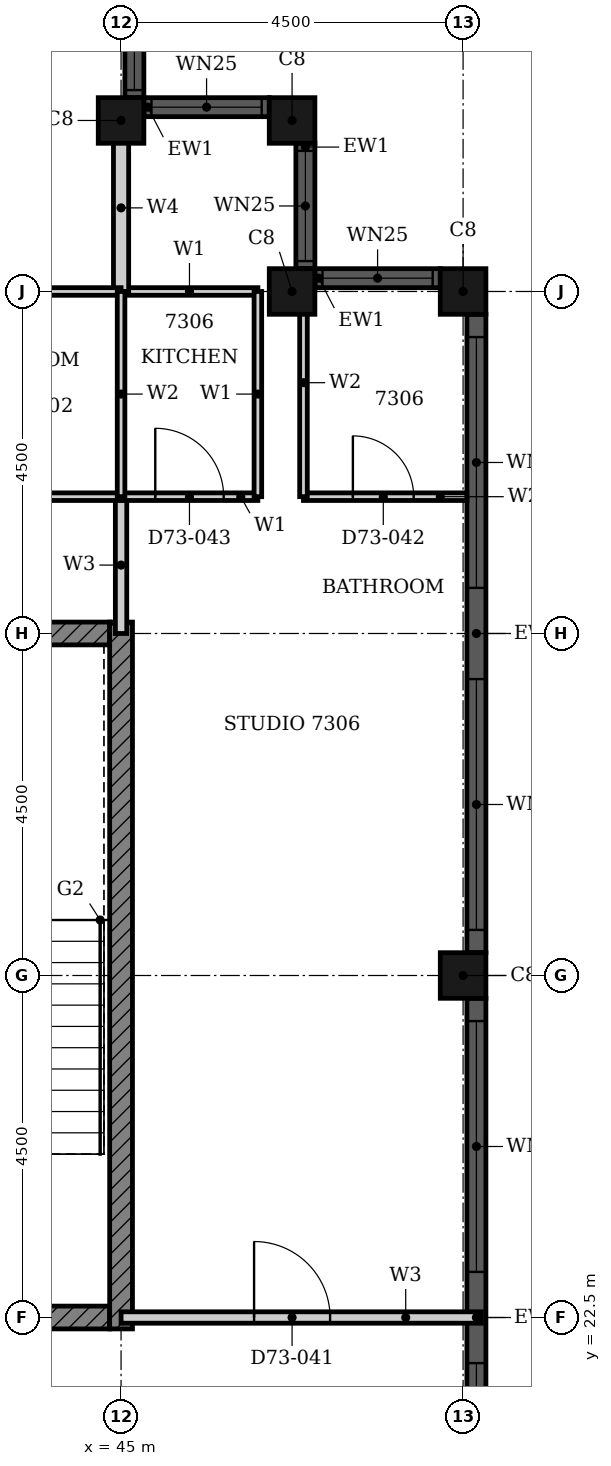
"""IFC4 building model, lengths in metres.
Left out: names, types, materials, properties, quantities, classifications, styles, units other than length and angle.
Written with IfcOpenShell. Run it as: python <this file> out.ifc"""

import sys

from ifc_helpers import new_model, si_unit, direction, frame, frame_2d, origin, origin_2d, place, context, subcontext, project, spatial, rectangle, hollow_rectangle, extrude, element, fill, save


model = new_model("IFC4")
c1 = context("Model", 3, precision=1e-05, world=origin(), true_north=direction((0.0, 1.0)))
c2 = subcontext(c1, "Body", "Model", "MODEL_VIEW")
j1 = project(units=[si_unit("LENGTHUNIT", "METRE"), si_unit("PLANEANGLEUNIT", "RADIAN")], contexts=[c1])
p1 = place(None, origin())
s1 = spatial("IfcSite", under=j1, at=p1, CompositionType="ELEMENT")
p2 = place(p1, origin())
s2 = spatial("IfcBuilding", under=s1, at=p2, CompositionType="ELEMENT")
p3 = place(p2, frame((0.0, 0.0, 287.1)))
s3 = spatial("IfcBuildingStorey", under=s2, at=p3, CompositionType="ELEMENT", Elevation=287.1)
for number, where, z_axis, x_axis in (
    (1, (49.5, 27.0, 0.0), (0.0, 0.0, 1.0), (1.0, 0.0, 0.0)),
    (2, (49.5, 36.0, 0.0), (0.0, 0.0, 1.0), (1.0, 0.0, 0.0)),
    (3, (47.25, 36.0, 0.0), (0.0, 0.0, 1.0), (1.0, 0.0, 0.0)),
    (4, (47.25, 38.25, 0.0), (0.0, 0.0, 1.0), (1.0, 0.0, 0.0)),
    (5, (45.0, 38.25, 0.0), (0.0, 0.0, 1.0), (1.0, 0.0, 0.0)),
):
    element("IfcColumn", number, at=place(p3, frame(where, z_axis=z_axis, x_axis=x_axis)), inside=s3, PredefinedType="COLUMN", context=c2, shape_type="SweptSolid", body=[
        extrude(hollow_rectangle(XDim=0.6, YDim=0.6, WallThickness=0.02, at=origin_2d()), origin(), (0.0, 0.0, 1.0), 3.7),
    ])
p4 = place(p3, frame((49.675, 18.3, 0.0), z_axis=(0.0, 0.0, 1.0), x_axis=(0.0, 1.0, 0.0)))
e6 = element("IfcWall", 6, at=p4, inside=s3, PredefinedType="SOLIDWALL", context=c2, shape_type="SweptSolid", body=[
    extrude(rectangle(XDim=8.4, YDim=0.25, at=frame_2d((4.2, 0.0))), origin(), (0.0, 0.0, 1.0), 3.7),
])
p5 = place(p4, frame((0.3, 0.0, 0.45)))
e7 = element("IfcOpeningElement", 7, at=p5, cuts=e6, PredefinedType="OPENING", context=c2, shape_type="SweptSolid", body=[
    extrude(rectangle(XDim=3.3, YDim=2.3, at=frame_2d((1.65, 1.15))), frame((0.0, 0.135, 0.0), z_axis=(0.0, -1.0, 0.0), x_axis=(1.0, 0.0, 0.0)), (0.0, 0.0, 1.0), 0.27),
])
p6 = place(p4, frame((4.8, 0.0, 0.45)))
e8 = element("IfcOpeningElement", 8, at=p6, cuts=e6, PredefinedType="OPENING", context=c2, shape_type="SweptSolid", body=[
    extrude(rectangle(XDim=3.3, YDim=2.3, at=frame_2d((1.65, 1.15))), frame((0.0, 0.135, 0.0), z_axis=(0.0, -1.0, 0.0), x_axis=(1.0, 0.0, 0.0)), (0.0, 0.0, 1.0), 0.27),
])
p7 = place(p3, frame((49.675, 27.3, 0.0), z_axis=(0.0, 0.0, 1.0), x_axis=(0.0, 1.0, 0.0)))
e9 = element("IfcWall", 9, at=p7, inside=s3, PredefinedType="SOLIDWALL", context=c2, shape_type="SweptSolid", body=[
    extrude(rectangle(XDim=8.4, YDim=0.25, at=frame_2d((4.2, 0.0))), origin(), (0.0, 0.0, 1.0), 3.7),
])
p8 = place(p7, frame((0.3, 0.0, 0.45)))
e10 = element("IfcOpeningElement", 10, at=p8, cuts=e9, PredefinedType="OPENING", context=c2, shape_type="SweptSolid", body=[
    extrude(rectangle(XDim=3.3, YDim=2.3, at=frame_2d((1.65, 1.15))), frame((0.0, 0.135, 0.0), z_axis=(0.0, -1.0, 0.0), x_axis=(1.0, 0.0, 0.0)), (0.0, 0.0, 1.0), 0.27),
])
p9 = place(p7, frame((4.8, 0.0, 0.45)))
e11 = element("IfcOpeningElement", 11, at=p9, cuts=e9, PredefinedType="OPENING", context=c2, shape_type="SweptSolid", body=[
    extrude(rectangle(XDim=3.3, YDim=2.3, at=frame_2d((1.65, 1.15))), frame((0.0, 0.135, 0.0), z_axis=(0.0, -1.0, 0.0), x_axis=(1.0, 0.0, 0.0)), (0.0, 0.0, 1.0), 0.27),
])
p10 = place(p3, frame((49.2, 36.175, 0.0), z_axis=(0.0, 0.0, 1.0), x_axis=(-1.0, 0.0, 0.0)))
e12 = element("IfcWall", 12, at=p10, inside=s3, PredefinedType="SOLIDWALL", context=c2, shape_type="SweptSolid", body=[
    extrude(rectangle(XDim=1.65, YDim=0.25, at=frame_2d((0.825, 0.0))), origin(), (0.0, 0.0, 1.0), 3.7),
])
p11 = place(p10, frame((0.1, 0.0, 0.9)))
e13 = element("IfcOpeningElement", 13, at=p11, cuts=e12, PredefinedType="OPENING", context=c2, shape_type="SweptSolid", body=[
    extrude(rectangle(XDim=1.45, YDim=1.85, at=frame_2d((0.725, 0.925))), frame((0.0, 0.135, 0.0), z_axis=(0.0, -1.0, 0.0), x_axis=(1.0, 0.0, 0.0)), (0.0, 0.0, 1.0), 0.27),
])
p12 = place(p3, frame((47.425, 36.3, 0.0), z_axis=(0.0, 0.0, 1.0), x_axis=(0.0, 1.0, 0.0)))
e14 = element("IfcWall", 14, at=p12, inside=s3, PredefinedType="SOLIDWALL", context=c2, shape_type="SweptSolid", body=[
    extrude(rectangle(XDim=1.65, YDim=0.25, at=frame_2d((0.825, 0.0))), origin(), (0.0, 0.0, 1.0), 3.7),
])
p13 = place(p12, frame((0.1, 0.0, 0.9)))
e15 = element("IfcOpeningElement", 15, at=p13, cuts=e14, PredefinedType="OPENING", context=c2, shape_type="SweptSolid", body=[
    extrude(rectangle(XDim=1.45, YDim=1.85, at=frame_2d((0.725, 0.925))), frame((0.0, 0.135, 0.0), z_axis=(0.0, -1.0, 0.0), x_axis=(1.0, 0.0, 0.0)), (0.0, 0.0, 1.0), 0.27),
])
p14 = place(p3, frame((46.95, 38.425, 0.0), z_axis=(0.0, 0.0, 1.0), x_axis=(-1.0, 0.0, 0.0)))
e16 = element("IfcWall", 16, at=p14, inside=s3, PredefinedType="SOLIDWALL", context=c2, shape_type="SweptSolid", body=[
    extrude(rectangle(XDim=1.65, YDim=0.25, at=frame_2d((0.825, 0.0))), origin(), (0.0, 0.0, 1.0), 3.7),
])
p15 = place(p14, frame((0.1, 0.0, 0.9)))
e17 = element("IfcOpeningElement", 17, at=p15, cuts=e16, PredefinedType="OPENING", context=c2, shape_type="SweptSolid", body=[
    extrude(rectangle(XDim=1.45, YDim=1.85, at=frame_2d((0.725, 0.925))), frame((0.0, 0.135, 0.0), z_axis=(0.0, -1.0, 0.0), x_axis=(1.0, 0.0, 0.0)), (0.0, 0.0, 1.0), 0.27),
])
p16 = place(p3, frame((45.175, 38.55, 0.0), z_axis=(0.0, 0.0, 1.0), x_axis=(0.0, 1.0, 0.0)))
e18 = element("IfcWall", 18, at=p16, inside=s3, PredefinedType="SOLIDWALL", context=c2, shape_type="SweptSolid", body=[
    extrude(rectangle(XDim=1.65, YDim=0.25, at=frame_2d((0.825, 0.0))), origin(), (0.0, 0.0, 1.0), 3.7),
])
p17 = place(p16, frame((0.1, 0.0, 0.9)))
e19 = element("IfcOpeningElement", 19, at=p17, cuts=e18, PredefinedType="OPENING", context=c2, shape_type="SweptSolid", body=[
    extrude(rectangle(XDim=1.45, YDim=1.85, at=frame_2d((0.725, 0.925))), frame((0.0, 0.135, 0.0), z_axis=(0.0, -1.0, 0.0), x_axis=(1.0, 0.0, 0.0)), (0.0, 0.0, 1.0), 0.27),
])
p18 = place(p3, frame((30.339, 22.5, 0.0), z_axis=(0.0, 0.0, 1.0), x_axis=(1.0, 0.0, 0.0)))
e20 = element("IfcWall", 20, at=p18, inside=s3, PredefinedType="SHEAR", context=c2, shape_type="SweptSolid", body=[
    extrude(rectangle(XDim=14.511, YDim=0.3, at=frame_2d((7.255, 0.0))), origin(), (0.0, 0.0, 1.0), 3.4),
])
p19 = place(p18, frame((7.975, 0.0, 0.0)))
e21 = element("IfcOpeningElement", 21, at=p19, cuts=e20, PredefinedType="OPENING", context=c2, shape_type="SweptSolid", body=[
    extrude(rectangle(XDim=1.8, YDim=2.1, at=frame_2d((0.9, 1.05))), frame((0.0, 0.16, 0.0), z_axis=(0.0, -1.0, 0.0), x_axis=(1.0, 0.0, 0.0)), (0.0, 0.0, 1.0), 0.32),
])
p20 = place(p3, frame((40.625, 31.5, 0.0), z_axis=(0.0, 0.0, 1.0), x_axis=(1.0, 0.0, 0.0)))
e22 = element("IfcWall", 22, at=p20, inside=s3, PredefinedType="SHEAR", context=c2, shape_type="SweptSolid", body=[
    extrude(rectangle(XDim=4.225, YDim=0.3, at=frame_2d((2.113, 0.0))), origin(), (0.0, 0.0, 1.0), 3.4),
])
p21 = place(p3, frame((45.0, 22.35, 0.0), z_axis=(0.0, 0.0, 1.0), x_axis=(0.0, 1.0, 0.0)))
e23 = element("IfcWall", 23, at=p21, inside=s3, PredefinedType="SHEAR", context=c2, shape_type="SweptSolid", body=[
    extrude(rectangle(XDim=9.3, YDim=0.3, at=frame_2d((4.65, 0.0))), origin(), (0.0, 0.0, 1.0), 3.4),
])
p22 = place(p3, frame((45.0, 22.5, 0.0), z_axis=(0.0, 0.0, 1.0), x_axis=(1.0, 0.0, 0.0)))
e24 = element("IfcWall", 24, at=p22, inside=s3, PredefinedType="PARTITIONING", context=c2, shape_type="SweptSolid", body=[
    extrude(rectangle(XDim=4.74, YDim=0.15, at=frame_2d((2.37, 0.0))), origin(), (0.0, 0.0, 1.0), 3.4),
])
p23 = place(p22, frame((1.75, 0.0, 0.0)))
e25 = element("IfcOpeningElement", 25, at=p23, cuts=e24, PredefinedType="OPENING", context=c2, shape_type="SweptSolid", body=[
    extrude(rectangle(XDim=1.0, YDim=2.2, at=frame_2d((0.5, 1.1))), frame((0.0, 0.085, 0.0), z_axis=(0.0, -1.0, 0.0), x_axis=(1.0, 0.0, 0.0)), (0.0, 0.0, 1.0), 0.17),
])
p24 = place(p3, frame((45.0, 31.5, 0.0), z_axis=(0.0, 0.0, 1.0), x_axis=(0.0, 1.0, 0.0)))
e26 = element("IfcWall", 26, at=p24, inside=s3, PredefinedType="PARTITIONING", context=c2, shape_type="SweptSolid", body=[
    extrude(rectangle(XDim=1.8, YDim=0.15, at=frame_2d((0.9, 0.0))), origin(), (0.0, 0.0, 1.0), 3.4),
])
p25 = place(p3, frame((45.0, 33.3, 0.0), z_axis=(0.0, 0.0, 1.0), x_axis=(1.0, 0.0, 0.0)))
e27 = element("IfcWall", 27, at=p25, inside=s3, PredefinedType="PARTITIONING", context=c2, shape_type="SweptSolid", body=[
    extrude(rectangle(XDim=1.8, YDim=0.1, at=frame_2d((0.9, 0.0))), origin(), (0.0, 0.0, 1.0), 3.4),
])
p26 = place(p25, frame((0.45, 0.0, 0.0)))
e28 = element("IfcOpeningElement", 28, at=p26, cuts=e27, PredefinedType="OPENING", context=c2, shape_type="SweptSolid", body=[
    extrude(rectangle(XDim=0.9, YDim=2.1, at=frame_2d((0.45, 1.05))), frame((0.0, 0.06, 0.0), z_axis=(0.0, -1.0, 0.0), x_axis=(1.0, 0.0, 0.0)), (0.0, 0.0, 1.0), 0.12),
])
p27 = place(p3, frame((45.0, 36.0, 0.0), z_axis=(0.0, 0.0, 1.0), x_axis=(1.0, 0.0, 0.0)))
e29 = element("IfcWall", 29, at=p27, inside=s3, PredefinedType="PARTITIONING", context=c2, shape_type="SweptSolid", body=[
    extrude(rectangle(XDim=1.8, YDim=0.1, at=frame_2d((0.9, 0.0))), origin(), (0.0, 0.0, 1.0), 3.4),
])
p28 = place(p3, frame((46.8, 33.3, 0.0), z_axis=(0.0, 0.0, 1.0), x_axis=(0.0, 1.0, 0.0)))
e30 = element("IfcWall", 30, at=p28, inside=s3, PredefinedType="PARTITIONING", context=c2, shape_type="SweptSolid", body=[
    extrude(rectangle(XDim=2.7, YDim=0.1, at=frame_2d((1.35, 0.0))), origin(), (0.0, 0.0, 1.0), 3.4),
])
p29 = place(p3, frame((45.0, 36.0, 0.0), z_axis=(0.0, 0.0, 1.0), x_axis=(0.0, 1.0, 0.0)))
e31 = element("IfcWall", 31, at=p29, inside=s3, PredefinedType="PARTITIONING", context=c2, shape_type="SweptSolid", body=[
    extrude(rectangle(XDim=2.2, YDim=0.2, at=frame_2d((1.1, 0.0))), origin(), (0.0, 0.0, 1.0), 3.4),
])
p30 = place(p3, frame((42.0, 33.3, 0.0), z_axis=(0.0, 0.0, 1.0), x_axis=(1.0, 0.0, 0.0)))
e32 = element("IfcWall", 32, at=p30, inside=s3, PredefinedType="PARTITIONING", context=c2, shape_type="SweptSolid", body=[
    extrude(rectangle(XDim=3.0, YDim=0.1, at=frame_2d((1.5, 0.0))), origin(), (0.0, 0.0, 1.0), 3.4),
])
p31 = place(p3, frame((47.4, 33.3, 0.0), z_axis=(0.0, 0.0, 1.0), x_axis=(1.0, 0.0, 0.0)))
e33 = element("IfcWall", 33, at=p31, inside=s3, PredefinedType="PARTITIONING", context=c2, shape_type="SweptSolid", body=[
    extrude(rectangle(XDim=2.15, YDim=0.1, at=frame_2d((1.075, 0.0))), origin(), (0.0, 0.0, 1.0), 3.4),
])
p32 = place(p31, frame((0.65, 0.0, 0.0)))
e34 = element("IfcOpeningElement", 34, at=p32, cuts=e33, PredefinedType="OPENING", context=c2, shape_type="SweptSolid", body=[
    extrude(rectangle(XDim=0.8, YDim=2.1, at=frame_2d((0.4, 1.05))), frame((0.0, 0.06, 0.0), z_axis=(0.0, -1.0, 0.0), x_axis=(1.0, 0.0, 0.0)), (0.0, 0.0, 1.0), 0.12),
])
p33 = place(p3, frame((42.0, 36.0, 0.0), z_axis=(0.0, 0.0, 1.0), x_axis=(1.0, 0.0, 0.0)))
e35 = element("IfcWall", 35, at=p33, inside=s3, PredefinedType="PARTITIONING", context=c2, shape_type="SweptSolid", body=[
    extrude(rectangle(XDim=3.0, YDim=0.1, at=frame_2d((1.5, 0.0))), origin(), (0.0, 0.0, 1.0), 3.4),
])
p34 = place(p3, frame((45.0, 33.3, 0.0), z_axis=(0.0, 0.0, 1.0), x_axis=(0.0, 1.0, 0.0)))
e36 = element("IfcWall", 36, at=p34, inside=s3, PredefinedType="PARTITIONING", context=c2, shape_type="SweptSolid", body=[
    extrude(rectangle(XDim=2.7, YDim=0.1, at=frame_2d((1.35, 0.0))), origin(), (0.0, 0.0, 1.0), 3.4),
])
p35 = place(p3, frame((47.4, 33.3, 0.0), z_axis=(0.0, 0.0, 1.0), x_axis=(0.0, 1.0, 0.0)))
e37 = element("IfcWall", 37, at=p35, inside=s3, PredefinedType="PARTITIONING", context=c2, shape_type="SweptSolid", body=[
    extrude(rectangle(XDim=3.0, YDim=0.1, at=frame_2d((1.5, 0.0))), origin(), (0.0, 0.0, 1.0), 3.4),
])
p36 = place(p5, origin())
e38 = element("IfcWindow", 38, at=p36, inside=s3, PartitioningType="SINGLE_PANEL", PredefinedType="WINDOW", context=c2, shape_type="SweptSolid", body=[
    extrude(rectangle(XDim=3.3, YDim=2.3, at=frame_2d((1.65, 1.15))), frame((0.0, 0.03, 0.0), z_axis=(0.0, -1.0, 0.0), x_axis=(1.0, 0.0, 0.0)), (0.0, 0.0, 1.0), 0.06),
])
fill(e7, e38)
p37 = place(p6, origin())
e39 = element("IfcWindow", 39, at=p37, inside=s3, PartitioningType="SINGLE_PANEL", PredefinedType="WINDOW", context=c2, shape_type="SweptSolid", body=[
    extrude(rectangle(XDim=3.3, YDim=2.3, at=frame_2d((1.65, 1.15))), frame((0.0, 0.03, 0.0), z_axis=(0.0, -1.0, 0.0), x_axis=(1.0, 0.0, 0.0)), (0.0, 0.0, 1.0), 0.06),
])
fill(e8, e39)
p38 = place(p8, origin())
e40 = element("IfcWindow", 40, at=p38, inside=s3, PartitioningType="SINGLE_PANEL", PredefinedType="WINDOW", context=c2, shape_type="SweptSolid", body=[
    extrude(rectangle(XDim=3.3, YDim=2.3, at=frame_2d((1.65, 1.15))), frame((0.0, 0.03, 0.0), z_axis=(0.0, -1.0, 0.0), x_axis=(1.0, 0.0, 0.0)), (0.0, 0.0, 1.0), 0.06),
])
fill(e10, e40)
p39 = place(p9, origin())
e41 = element("IfcWindow", 41, at=p39, inside=s3, PartitioningType="SINGLE_PANEL", PredefinedType="WINDOW", context=c2, shape_type="SweptSolid", body=[
    extrude(rectangle(XDim=3.3, YDim=2.3, at=frame_2d((1.65, 1.15))), frame((0.0, 0.03, 0.0), z_axis=(0.0, -1.0, 0.0), x_axis=(1.0, 0.0, 0.0)), (0.0, 0.0, 1.0), 0.06),
])
fill(e11, e41)
p40 = place(p11, origin())
e42 = element("IfcWindow", 42, at=p40, inside=s3, PartitioningType="SINGLE_PANEL", PredefinedType="WINDOW", context=c2, shape_type="SweptSolid", body=[
    extrude(rectangle(XDim=1.45, YDim=1.85, at=frame_2d((0.725, 0.925))), frame((0.0, 0.03, 0.0), z_axis=(0.0, -1.0, 0.0), x_axis=(1.0, 0.0, 0.0)), (0.0, 0.0, 1.0), 0.06),
])
fill(e13, e42)
p41 = place(p13, origin())
e43 = element("IfcWindow", 43, at=p41, inside=s3, PartitioningType="SINGLE_PANEL", PredefinedType="WINDOW", context=c2, shape_type="SweptSolid", body=[
    extrude(rectangle(XDim=1.45, YDim=1.85, at=frame_2d((0.725, 0.925))), frame((0.0, 0.03, 0.0), z_axis=(0.0, -1.0, 0.0), x_axis=(1.0, 0.0, 0.0)), (0.0, 0.0, 1.0), 0.06),
])
fill(e15, e43)
p42 = place(p15, origin())
e44 = element("IfcWindow", 44, at=p42, inside=s3, PartitioningType="SINGLE_PANEL", PredefinedType="WINDOW", context=c2, shape_type="SweptSolid", body=[
    extrude(rectangle(XDim=1.45, YDim=1.85, at=frame_2d((0.725, 0.925))), frame((0.0, 0.03, 0.0), z_axis=(0.0, -1.0, 0.0), x_axis=(1.0, 0.0, 0.0)), (0.0, 0.0, 1.0), 0.06),
])
fill(e17, e44)
p43 = place(p17, origin())
e45 = element("IfcWindow", 45, at=p43, inside=s3, PartitioningType="SINGLE_PANEL", PredefinedType="WINDOW", context=c2, shape_type="SweptSolid", body=[
    extrude(rectangle(XDim=1.45, YDim=1.85, at=frame_2d((0.725, 0.925))), frame((0.0, 0.03, 0.0), z_axis=(0.0, -1.0, 0.0), x_axis=(1.0, 0.0, 0.0)), (0.0, 0.0, 1.0), 0.06),
])
fill(e19, e45)
p44 = place(p23, origin())
e46 = element("IfcDoor", 46, at=p44, inside=s3, OperationType="SINGLE_SWING_RIGHT", PredefinedType="DOOR", context=c2, shape_type="SweptSolid", body=[
    extrude(rectangle(XDim=1.0, YDim=2.2, at=frame_2d((0.5, 1.1))), frame((0.0, 0.025, 0.0), z_axis=(0.0, -1.0, 0.0), x_axis=(1.0, 0.0, 0.0)), (0.0, 0.0, 1.0), 0.05),
])
fill(e25, e46)
p45 = place(p32, origin())
e47 = element("IfcDoor", 47, at=p45, inside=s3, OperationType="SINGLE_SWING_RIGHT", PredefinedType="DOOR", context=c2, shape_type="SweptSolid", body=[
    extrude(rectangle(XDim=0.8, YDim=2.1, at=frame_2d((0.4, 1.05))), frame((0.0, 0.025, 0.0), z_axis=(0.0, -1.0, 0.0), x_axis=(1.0, 0.0, 0.0)), (0.0, 0.0, 1.0), 0.05),
])
fill(e34, e47)
p46 = place(p26, origin())
e48 = element("IfcDoor", 48, at=p46, inside=s3, OperationType="SINGLE_SWING_RIGHT", PredefinedType="DOOR", context=c2, shape_type="SweptSolid", body=[
    extrude(rectangle(XDim=0.9, YDim=2.1, at=frame_2d((0.45, 1.05))), frame((0.0, 0.025, 0.0), z_axis=(0.0, -1.0, 0.0), x_axis=(1.0, 0.0, 0.0)), (0.0, 0.0, 1.0), 0.05),
])
fill(e28, e48)
save(model, sys.argv[1])
